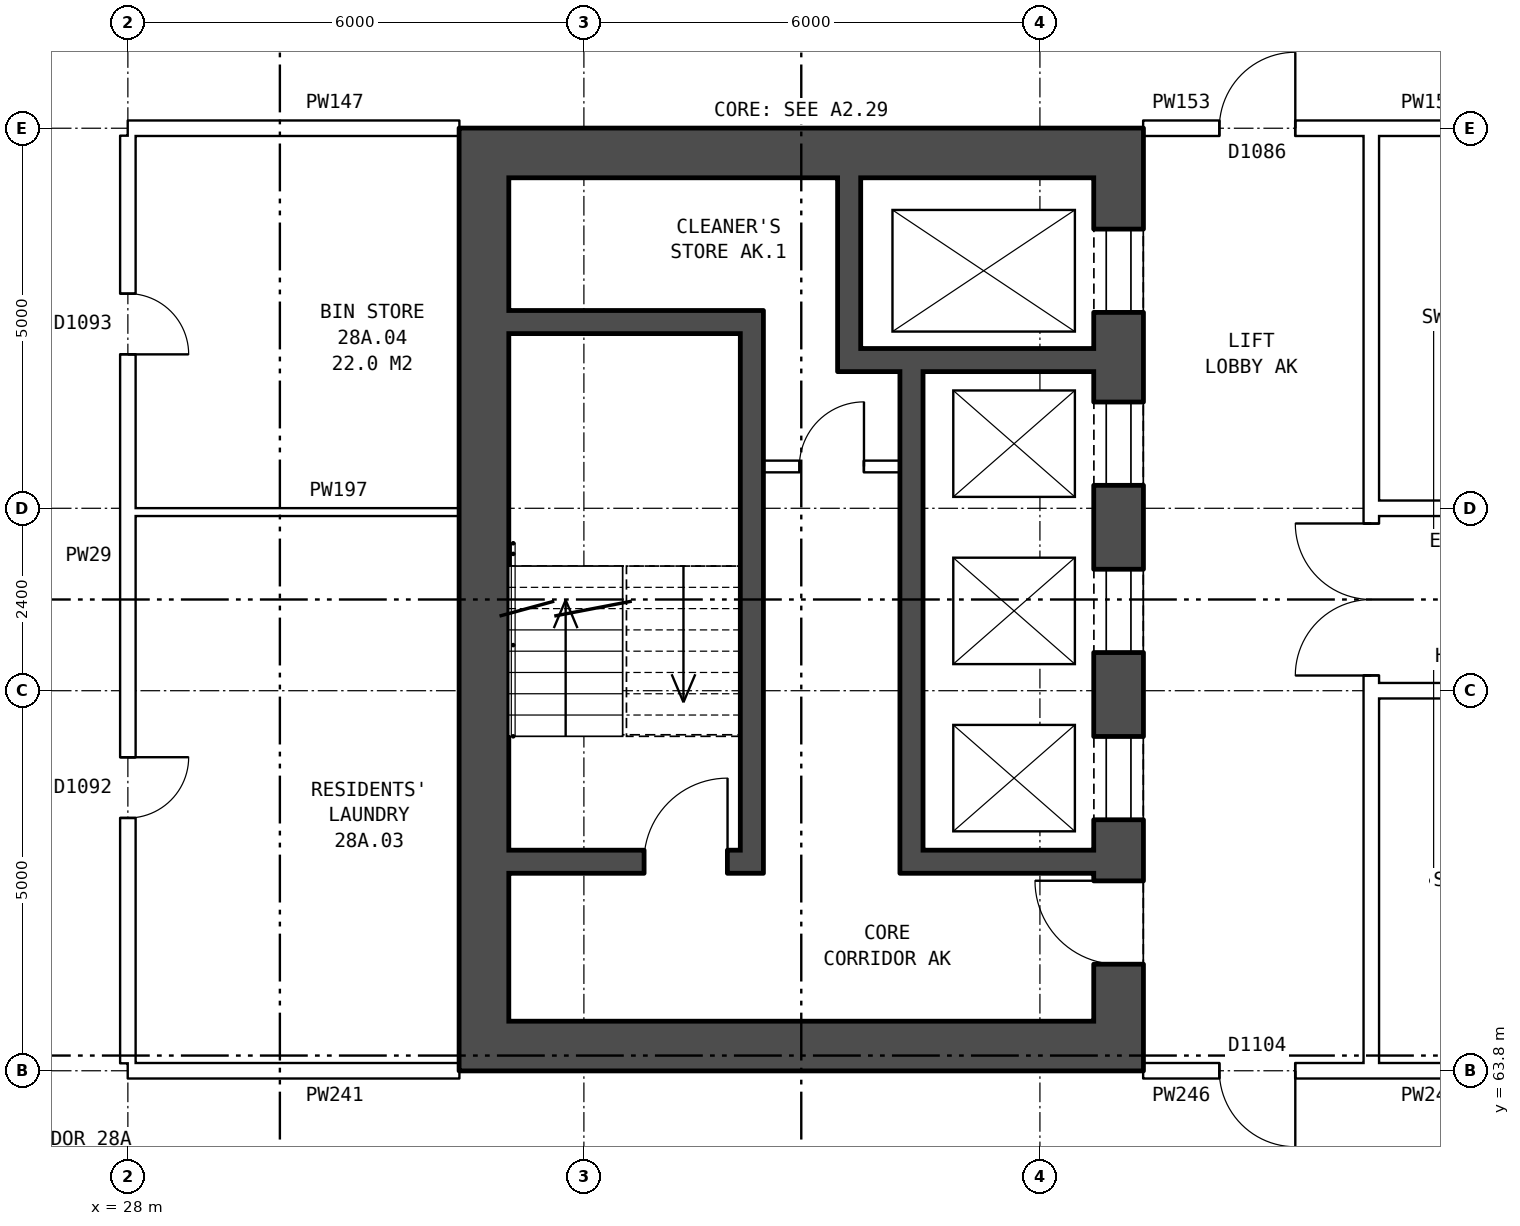
"""IFC4 building model, lengths in metres.
Left out: names, types, materials, properties, quantities, classifications, styles, units other than length and angle.
Written with IfcOpenShell. Run it as: python <this file> out.ifc"""

import sys

from ifc_helpers import new_model, si_unit, direction, frame, frame_2d, origin, place, context, subcontext, project, spatial, rectangle, extrude, element, fill, save


model = new_model("IFC4")
c1 = context("Model", 3, precision=1e-05, world=origin(), true_north=direction((0.0, 1.0)))
c2 = subcontext(c1, "Body", "Model", "MODEL_VIEW")
j1 = project(units=[si_unit("LENGTHUNIT", "METRE"), si_unit("PLANEANGLEUNIT", "RADIAN")], contexts=[c1])
p1 = place(None, origin())
s1 = spatial("IfcSite", under=j1, at=p1, CompositionType="ELEMENT")
p2 = place(p1, origin())
s2 = spatial("IfcBuilding", under=s1, at=p2, CompositionType="ELEMENT")
p3 = place(p2, frame((0.0, 0.0, 102.6)))
s3 = spatial("IfcBuildingStorey", under=s2, at=p3, CompositionType="ELEMENT", Elevation=102.6)
p4 = place(p3, frame((41.035, 75.55, 0.0), z_axis=(0.0, 0.0, 1.0), x_axis=(0.0, -1.0, 0.0)))
e1 = element("IfcWall", 1, at=p4, inside=s3, PredefinedType="SHEAR", context=c2, shape_type="SweptSolid", body=[
    extrude(rectangle(XDim=11.1, YDim=0.65, at=frame_2d((5.55, 0.0))), origin(), (0.0, 0.0, 1.0), 2.85),
])
p5 = place(p4, frame((0.675, 0.0, 0.0)))
e2 = element("IfcOpeningElement", 2, at=p5, cuts=e1, PredefinedType="OPENING", context=c2, shape_type="SweptSolid", body=[
    extrude(rectangle(XDim=1.1, YDim=2.1, at=frame_2d((0.55, 1.05))), frame((0.0, 0.335, 0.0), z_axis=(0.0, -1.0, 0.0), x_axis=(1.0, 0.0, 0.0)), (0.0, 0.0, 1.0), 0.67),
])
p6 = place(p4, frame((2.95, 0.0, 0.0)))
e3 = element("IfcOpeningElement", 3, at=p6, cuts=e1, PredefinedType="OPENING", context=c2, shape_type="SweptSolid", body=[
    extrude(rectangle(XDim=1.1, YDim=2.1, at=frame_2d((0.55, 1.05))), frame((0.0, 0.335, 0.0), z_axis=(0.0, -1.0, 0.0), x_axis=(1.0, 0.0, 0.0)), (0.0, 0.0, 1.0), 0.67),
])
p7 = place(p4, frame((5.15, 0.0, 0.0)))
e4 = element("IfcOpeningElement", 4, at=p7, cuts=e1, PredefinedType="OPENING", context=c2, shape_type="SweptSolid", body=[
    extrude(rectangle(XDim=1.1, YDim=2.1, at=frame_2d((0.55, 1.05))), frame((0.0, 0.335, 0.0), z_axis=(0.0, -1.0, 0.0), x_axis=(1.0, 0.0, 0.0)), (0.0, 0.0, 1.0), 0.67),
])
p8 = place(p4, frame((7.35, 0.0, 0.0)))
e5 = element("IfcOpeningElement", 5, at=p8, cuts=e1, PredefinedType="OPENING", context=c2, shape_type="SweptSolid", body=[
    extrude(rectangle(XDim=1.1, YDim=2.1, at=frame_2d((0.55, 1.05))), frame((0.0, 0.335, 0.0), z_axis=(0.0, -1.0, 0.0), x_axis=(1.0, 0.0, 0.0)), (0.0, 0.0, 1.0), 0.67),
])
p9 = place(p4, frame((9.25, 0.0, 0.0)))
e6 = element("IfcOpeningElement", 6, at=p9, cuts=e1, PredefinedType="OPENING", context=c2, shape_type="SweptSolid", body=[
    extrude(rectangle(XDim=1.1, YDim=2.1, at=frame_2d((0.55, 1.05))), frame((0.0, 0.335, 0.0), z_axis=(0.0, -1.0, 0.0), x_axis=(1.0, 0.0, 0.0)), (0.0, 0.0, 1.0), 0.67),
])
p10 = place(p3, frame((32.685, 75.55, 0.0), z_axis=(0.0, 0.0, 1.0), x_axis=(0.0, -1.0, 0.0)))
e7 = element("IfcWall", 7, at=p10, inside=s3, PredefinedType="SHEAR", context=c2, shape_type="SweptSolid", body=[
    extrude(rectangle(XDim=11.1, YDim=0.65, at=frame_2d((5.55, 0.0))), origin(), (0.0, 0.0, 1.0), 2.85),
])
for number, where, z_axis, x_axis in (
    (8, (41.36, 75.875, 0.0), (0.0, 0.0, 1.0), (-1.0, 0.0, 0.0)),
    (9, (41.36, 64.125, 0.0), (0.0, 0.0, 1.0), (-1.0, 0.0, 0.0)),
):
    element("IfcWall", number, at=place(p3, frame(where, z_axis=z_axis, x_axis=x_axis)), inside=s3, PredefinedType="SHEAR", context=c2, shape_type="SweptSolid", body=[
        extrude(rectangle(XDim=9.0, YDim=0.65, at=frame_2d((4.5, 0.0))), origin(), (0.0, 0.0, 1.0), 2.85),
    ])
p11 = place(p3, frame((36.06, 73.65, 0.0), z_axis=(0.0, 0.0, 1.0), x_axis=(-1.0, 0.0, 0.0)))
e10 = element("IfcWall", 10, at=p11, inside=s3, PredefinedType="SHEAR", context=c2, shape_type="SweptSolid", body=[
    extrude(rectangle(XDim=3.05, YDim=0.3, at=frame_2d((1.525, 0.0))), origin(), (0.0, 0.0, 1.0), 2.85),
])
p12 = place(p3, frame((40.71, 73.15, 0.0), z_axis=(0.0, 0.0, 1.0), x_axis=(-1.0, 0.0, 0.0)))
e11 = element("IfcWall", 11, at=p12, inside=s3, PredefinedType="SHEAR", context=c2, shape_type="SweptSolid", body=[
    extrude(rectangle(XDim=3.37, YDim=0.3, at=frame_2d((1.685, 0.0))), origin(), (0.0, 0.0, 1.0), 2.85),
])
p13 = place(p3, frame((38.16, 71.75, 0.0), z_axis=(0.0, 0.0, 1.0), x_axis=(-1.0, 0.0, 0.0)))
e12 = element("IfcWall", 12, at=p13, inside=s3, PredefinedType="PARTITIONING", context=c2, shape_type="SweptSolid", body=[
    extrude(rectangle(XDim=1.8, YDim=0.15, at=frame_2d((0.9, 0.0))), origin(), (0.0, 0.0, 1.0), 2.85),
])
p14 = place(p13, frame((0.475, 0.0, 0.0)))
e13 = element("IfcOpeningElement", 13, at=p14, cuts=e12, PredefinedType="OPENING", context=c2, shape_type="SweptSolid", body=[
    extrude(rectangle(XDim=0.85, YDim=2.1, at=frame_2d((0.425, 1.05))), frame((0.0, 0.085, 0.0), z_axis=(0.0, -1.0, 0.0), x_axis=(1.0, 0.0, 0.0)), (0.0, 0.0, 1.0), 0.17),
])
p15 = place(p3, frame((40.71, 66.55, 0.0), z_axis=(0.0, 0.0, 1.0), x_axis=(-1.0, 0.0, 0.0)))
e14 = element("IfcWall", 14, at=p15, inside=s3, PredefinedType="SHEAR", context=c2, shape_type="SweptSolid", body=[
    extrude(rectangle(XDim=2.25, YDim=0.3, at=frame_2d((1.125, 0.0))), origin(), (0.0, 0.0, 1.0), 2.85),
])
p16 = place(p3, frame((36.06, 66.55, 0.0), z_axis=(0.0, 0.0, 1.0), x_axis=(-1.0, 0.0, 0.0)))
e15 = element("IfcWall", 15, at=p16, inside=s3, PredefinedType="SHEAR", context=c2, shape_type="SweptSolid", body=[
    extrude(rectangle(XDim=3.05, YDim=0.3, at=frame_2d((1.525, 0.0))), origin(), (0.0, 0.0, 1.0), 2.85),
])
p17 = place(p16, frame((0.17, 0.0, 0.0)))
e16 = element("IfcOpeningElement", 16, at=p17, cuts=e15, PredefinedType="OPENING", context=c2, shape_type="SweptSolid", body=[
    extrude(rectangle(XDim=1.1, YDim=2.1, at=frame_2d((0.55, 1.05))), frame((0.0, 0.16, 0.0), z_axis=(0.0, -1.0, 0.0), x_axis=(1.0, 0.0, 0.0)), (0.0, 0.0, 1.0), 0.32),
])
p18 = place(p3, frame((38.31, 73.0, 0.0), z_axis=(0.0, 0.0, 1.0), x_axis=(0.0, -1.0, 0.0)))
e17 = element("IfcWall", 17, at=p18, inside=s3, PredefinedType="SHEAR", context=c2, shape_type="SweptSolid", body=[
    extrude(rectangle(XDim=6.6, YDim=0.3, at=frame_2d((3.3, 0.0))), origin(), (0.0, 0.0, 1.0), 2.85),
])
p19 = place(p3, frame((37.49, 75.55, 0.0), z_axis=(0.0, 0.0, 1.0), x_axis=(0.0, -1.0, 0.0)))
e18 = element("IfcWall", 18, at=p19, inside=s3, PredefinedType="SHEAR", context=c2, shape_type="SweptSolid", body=[
    extrude(rectangle(XDim=2.25, YDim=0.3, at=frame_2d((1.125, 0.0))), origin(), (0.0, 0.0, 1.0), 2.85),
])
p20 = place(p3, frame((36.21, 73.8, 0.0), z_axis=(0.0, 0.0, 1.0), x_axis=(0.0, -1.0, 0.0)))
e19 = element("IfcWall", 19, at=p20, inside=s3, PredefinedType="SHEAR", context=c2, shape_type="SweptSolid", body=[
    extrude(rectangle(XDim=7.4, YDim=0.3, at=frame_2d((3.7, 0.0))), origin(), (0.0, 0.0, 1.0), 2.85),
])
p21 = place(p3, frame((44.36, 63.9, 0.0), z_axis=(0.0, 0.0, 1.0), x_axis=(0.0, 1.0, 0.0)))
e20 = element("IfcWall", 20, at=p21, inside=s3, PredefinedType="PARTITIONING", context=c2, shape_type="SweptSolid", body=[
    extrude(rectangle(XDim=12.2, YDim=0.2, at=frame_2d((6.1, 0.0))), origin(), (0.0, 0.0, 1.0), 2.85),
])
p22 = place(p21, frame((5.1, 0.0, 0.0)))
e21 = element("IfcOpeningElement", 21, at=p22, cuts=e20, PredefinedType="OPENING", context=c2, shape_type="SweptSolid", body=[
    extrude(rectangle(XDim=2.0, YDim=2.1, at=frame_2d((1.0, 1.05))), frame((0.0, 0.11, 0.0), z_axis=(0.0, -1.0, 0.0), x_axis=(1.0, 0.0, 0.0)), (0.0, 0.0, 1.0), 0.22),
])
p23 = place(p3, frame((28.0, 63.8, 0.0), z_axis=(0.0, 0.0, 1.0), x_axis=(1.0, 0.0, 0.0)))
e22 = element("IfcWall", 22, at=p23, inside=s3, PredefinedType="PARTITIONING", context=c2, shape_type="SweptSolid", body=[
    extrude(rectangle(XDim=4.36, YDim=0.2, at=frame_2d((2.18, 0.0))), origin(), (0.0, 0.0, 1.0), 2.85),
])
p24 = place(p3, frame((41.36, 63.8, 0.0), z_axis=(0.0, 0.0, 1.0), x_axis=(1.0, 0.0, 0.0)))
e23 = element("IfcWall", 23, at=p24, inside=s3, PredefinedType="PARTITIONING", context=c2, shape_type="SweptSolid", body=[
    extrude(rectangle(XDim=3.0, YDim=0.2, at=frame_2d((1.5, 0.0))), origin(), (0.0, 0.0, 1.0), 2.85),
])
p25 = place(p24, frame((1.0, 0.0, 0.0)))
e24 = element("IfcOpeningElement", 24, at=p25, cuts=e23, PredefinedType="OPENING", context=c2, shape_type="SweptSolid", body=[
    extrude(rectangle(XDim=1.0, YDim=2.1, at=frame_2d((0.5, 1.05))), frame((0.0, 0.11, 0.0), z_axis=(0.0, -1.0, 0.0), x_axis=(1.0, 0.0, 0.0)), (0.0, 0.0, 1.0), 0.22),
])
p26 = place(p3, frame((44.36, 63.8, 0.0), z_axis=(0.0, 0.0, 1.0), x_axis=(1.0, 0.0, 0.0)))
e25 = element("IfcWall", 25, at=p26, inside=s3, PredefinedType="PARTITIONING", context=c2, shape_type="SweptSolid", body=[
    extrude(rectangle(XDim=1.54, YDim=0.2, at=frame_2d((0.77, 0.0))), origin(), (0.0, 0.0, 1.0), 2.85),
])
p27 = place(p3, frame((44.36, 68.8, 0.0), z_axis=(0.0, 0.0, 1.0), x_axis=(1.0, 0.0, 0.0)))
e26 = element("IfcWall", 26, at=p27, inside=s3, PredefinedType="PARTITIONING", context=c2, shape_type="SweptSolid", body=[
    extrude(rectangle(XDim=19.28, YDim=0.2, at=frame_2d((9.64, 0.0))), origin(), (0.0, 0.0, 1.0), 2.85),
])
p28 = place(p27, frame((14.64, 0.0, 0.0)))
e27 = element("IfcOpeningElement", 27, at=p28, cuts=e26, PredefinedType="OPENING", context=c2, shape_type="SweptSolid", body=[
    extrude(rectangle(XDim=1.0, YDim=2.1, at=frame_2d((0.5, 1.05))), frame((0.0, 0.11, 0.0), z_axis=(0.0, -1.0, 0.0), x_axis=(1.0, 0.0, 0.0)), (0.0, 0.0, 1.0), 0.22),
])
p29 = place(p27, frame((11.64, 0.0, 0.0)))
e28 = element("IfcOpeningElement", 28, at=p29, cuts=e26, PredefinedType="OPENING", context=c2, shape_type="SweptSolid", body=[
    extrude(rectangle(XDim=1.0, YDim=2.1, at=frame_2d((0.5, 1.05))), frame((0.0, 0.11, 0.0), z_axis=(0.0, -1.0, 0.0), x_axis=(1.0, 0.0, 0.0)), (0.0, 0.0, 1.0), 0.22),
])
p30 = place(p27, frame((5.64, 0.0, 0.0)))
e29 = element("IfcOpeningElement", 29, at=p30, cuts=e26, PredefinedType="OPENING", context=c2, shape_type="SweptSolid", body=[
    extrude(rectangle(XDim=1.0, YDim=2.1, at=frame_2d((0.5, 1.05))), frame((0.0, 0.11, 0.0), z_axis=(0.0, -1.0, 0.0), x_axis=(1.0, 0.0, 0.0)), (0.0, 0.0, 1.0), 0.22),
])
p31 = place(p3, frame((28.1, 71.15, 0.0), z_axis=(0.0, 0.0, 1.0), x_axis=(1.0, 0.0, 0.0)))
e30 = element("IfcWall", 30, at=p31, inside=s3, PredefinedType="PARTITIONING", context=c2, shape_type="SweptSolid", body=[
    extrude(rectangle(XDim=4.26, YDim=0.1, at=frame_2d((2.13, 0.0))), origin(), (0.0, 0.0, 1.0), 2.85),
])
p32 = place(p3, frame((44.36, 71.2, 0.0), z_axis=(0.0, 0.0, 1.0), x_axis=(1.0, 0.0, 0.0)))
e31 = element("IfcWall", 31, at=p32, inside=s3, PredefinedType="PARTITIONING", context=c2, shape_type="SweptSolid", body=[
    extrude(rectangle(XDim=19.28, YDim=0.2, at=frame_2d((9.64, 0.0))), origin(), (0.0, 0.0, 1.0), 2.85),
])
p33 = place(p32, frame((14.64, 0.0, 0.0)))
e32 = element("IfcOpeningElement", 32, at=p33, cuts=e31, PredefinedType="OPENING", context=c2, shape_type="SweptSolid", body=[
    extrude(rectangle(XDim=1.0, YDim=2.1, at=frame_2d((0.5, 1.05))), frame((0.0, 0.11, 0.0), z_axis=(0.0, -1.0, 0.0), x_axis=(1.0, 0.0, 0.0)), (0.0, 0.0, 1.0), 0.22),
])
p34 = place(p32, frame((5.64, 0.0, 0.0)))
e33 = element("IfcOpeningElement", 33, at=p34, cuts=e31, PredefinedType="OPENING", context=c2, shape_type="SweptSolid", body=[
    extrude(rectangle(XDim=1.0, YDim=2.1, at=frame_2d((0.5, 1.05))), frame((0.0, 0.11, 0.0), z_axis=(0.0, -1.0, 0.0), x_axis=(1.0, 0.0, 0.0)), (0.0, 0.0, 1.0), 0.22),
])
p35 = place(p3, frame((28.0, 76.2, 0.0), z_axis=(0.0, 0.0, 1.0), x_axis=(1.0, 0.0, 0.0)))
e34 = element("IfcWall", 34, at=p35, inside=s3, PredefinedType="PARTITIONING", context=c2, shape_type="SweptSolid", body=[
    extrude(rectangle(XDim=4.36, YDim=0.2, at=frame_2d((2.18, 0.0))), origin(), (0.0, 0.0, 1.0), 2.85),
])
p36 = place(p3, frame((41.36, 76.2, 0.0), z_axis=(0.0, 0.0, 1.0), x_axis=(1.0, 0.0, 0.0)))
e35 = element("IfcWall", 35, at=p36, inside=s3, PredefinedType="PARTITIONING", context=c2, shape_type="SweptSolid", body=[
    extrude(rectangle(XDim=3.0, YDim=0.2, at=frame_2d((1.5, 0.0))), origin(), (0.0, 0.0, 1.0), 2.85),
])
p37 = place(p36, frame((1.0, 0.0, 0.0)))
e36 = element("IfcOpeningElement", 36, at=p37, cuts=e35, PredefinedType="OPENING", context=c2, shape_type="SweptSolid", body=[
    extrude(rectangle(XDim=1.0, YDim=2.1, at=frame_2d((0.5, 1.05))), frame((0.0, 0.11, 0.0), z_axis=(0.0, -1.0, 0.0), x_axis=(1.0, 0.0, 0.0)), (0.0, 0.0, 1.0), 0.22),
])
p38 = place(p3, frame((44.36, 76.2, 0.0), z_axis=(0.0, 0.0, 1.0), x_axis=(1.0, 0.0, 0.0)))
e37 = element("IfcWall", 37, at=p38, inside=s3, PredefinedType="PARTITIONING", context=c2, shape_type="SweptSolid", body=[
    extrude(rectangle(XDim=1.54, YDim=0.2, at=frame_2d((0.77, 0.0))), origin(), (0.0, 0.0, 1.0), 2.85),
])
p39 = place(p3, frame((28.0, 63.9, 0.0), z_axis=(0.0, 0.0, 1.0), x_axis=(0.0, 1.0, 0.0)))
e38 = element("IfcWall", 38, at=p39, inside=s3, PredefinedType="PARTITIONING", context=c2, shape_type="SweptSolid", body=[
    extrude(rectangle(XDim=12.2, YDim=0.2, at=frame_2d((6.1, 0.0))), origin(), (0.0, 0.0, 1.0), 2.85),
])
p40 = place(p39, frame((3.225, 0.0, 0.0)))
e39 = element("IfcOpeningElement", 39, at=p40, cuts=e38, PredefinedType="OPENING", context=c2, shape_type="SweptSolid", body=[
    extrude(rectangle(XDim=0.8, YDim=2.1, at=frame_2d((0.4, 1.05))), frame((0.0, 0.11, 0.0), z_axis=(0.0, -1.0, 0.0), x_axis=(1.0, 0.0, 0.0)), (0.0, 0.0, 1.0), 0.22),
])
p41 = place(p39, frame((9.325, 0.0, 0.0)))
e40 = element("IfcOpeningElement", 40, at=p41, cuts=e38, PredefinedType="OPENING", context=c2, shape_type="SweptSolid", body=[
    extrude(rectangle(XDim=0.8, YDim=2.1, at=frame_2d((0.4, 1.05))), frame((0.0, 0.11, 0.0), z_axis=(0.0, -1.0, 0.0), x_axis=(1.0, 0.0, 0.0)), (0.0, 0.0, 1.0), 0.22),
])
p42 = place(p5, origin())
e41 = element("IfcDoor", 41, at=p42, inside=s3, OperationType="DOUBLE_DOOR_SLIDING", PredefinedType="DOOR", context=c2, shape_type="SweptSolid", body=[
    extrude(rectangle(XDim=1.1, YDim=2.1, at=frame_2d((0.55, 1.05))), frame((0.0, -0.26, 0.0), z_axis=(0.0, -1.0, 0.0), x_axis=(1.0, 0.0, 0.0)), (0.0, 0.0, 1.0), 0.05),
])
fill(e2, e41)
p43 = place(p6, origin())
e42 = element("IfcDoor", 42, at=p43, inside=s3, OperationType="DOUBLE_DOOR_SLIDING", PredefinedType="DOOR", context=c2, shape_type="SweptSolid", body=[
    extrude(rectangle(XDim=1.1, YDim=2.1, at=frame_2d((0.55, 1.05))), frame((0.0, -0.26, 0.0), z_axis=(0.0, -1.0, 0.0), x_axis=(1.0, 0.0, 0.0)), (0.0, 0.0, 1.0), 0.05),
])
fill(e3, e42)
p44 = place(p7, origin())
e43 = element("IfcDoor", 43, at=p44, inside=s3, OperationType="DOUBLE_DOOR_SLIDING", PredefinedType="DOOR", context=c2, shape_type="SweptSolid", body=[
    extrude(rectangle(XDim=1.1, YDim=2.1, at=frame_2d((0.55, 1.05))), frame((0.0, -0.26, 0.0), z_axis=(0.0, -1.0, 0.0), x_axis=(1.0, 0.0, 0.0)), (0.0, 0.0, 1.0), 0.05),
])
fill(e4, e43)
p45 = place(p8, origin())
e44 = element("IfcDoor", 44, at=p45, inside=s3, OperationType="DOUBLE_DOOR_SLIDING", PredefinedType="DOOR", context=c2, shape_type="SweptSolid", body=[
    extrude(rectangle(XDim=1.1, YDim=2.1, at=frame_2d((0.55, 1.05))), frame((0.0, -0.26, 0.0), z_axis=(0.0, -1.0, 0.0), x_axis=(1.0, 0.0, 0.0)), (0.0, 0.0, 1.0), 0.05),
])
fill(e5, e44)
p46 = place(p9, frame((1.1, 0.0, 0.0), z_axis=(0.0, 0.0, 1.0), x_axis=(-1.0, 0.0, 0.0)))
e45 = element("IfcDoor", 45, at=p46, inside=s3, OperationType="SINGLE_SWING_RIGHT", PredefinedType="DOOR", context=c2, shape_type="SweptSolid", body=[
    extrude(rectangle(XDim=1.1, YDim=2.1, at=frame_2d((0.55, 1.05))), frame((0.0, 0.31, 0.0), z_axis=(0.0, -1.0, 0.0), x_axis=(1.0, 0.0, 0.0)), (0.0, 0.0, 1.0), 0.05),
])
fill(e6, e45)
p47 = place(p17, frame((1.1, 0.0, 0.0), z_axis=(0.0, 0.0, 1.0), x_axis=(-1.0, 0.0, 0.0)))
e46 = element("IfcDoor", 46, at=p47, inside=s3, OperationType="SINGLE_SWING_RIGHT", PredefinedType="DOOR", context=c2, shape_type="SweptSolid", body=[
    extrude(rectangle(XDim=1.1, YDim=2.1, at=frame_2d((0.55, 1.05))), frame((0.0, 0.025, 0.0), z_axis=(0.0, -1.0, 0.0), x_axis=(1.0, 0.0, 0.0)), (0.0, 0.0, 1.0), 0.05),
])
fill(e16, e46)
p48 = place(p14, frame((0.85, 0.0, 0.0), z_axis=(0.0, 0.0, 1.0), x_axis=(-1.0, 0.0, 0.0)))
e47 = element("IfcDoor", 47, at=p48, inside=s3, OperationType="SINGLE_SWING_RIGHT", PredefinedType="DOOR", context=c2, shape_type="SweptSolid", body=[
    extrude(rectangle(XDim=0.85, YDim=2.1, at=frame_2d((0.425, 1.05))), frame((0.0, 0.025, 0.0), z_axis=(0.0, -1.0, 0.0), x_axis=(1.0, 0.0, 0.0)), (0.0, 0.0, 1.0), 0.05),
])
fill(e13, e47)
p49 = place(p22, origin())
e48 = element("IfcDoor", 48, at=p49, inside=s3, OperationType="DOUBLE_DOOR_SINGLE_SWING", PredefinedType="DOOR", context=c2, shape_type="SweptSolid", body=[
    extrude(rectangle(XDim=2.0, YDim=2.1, at=frame_2d((1.0, 1.05))), frame((0.0, 0.025, 0.0), z_axis=(0.0, -1.0, 0.0), x_axis=(1.0, 0.0, 0.0)), (0.0, 0.0, 1.0), 0.05),
])
fill(e21, e48)
p50 = place(p25, frame((1.0, 0.0, 0.0), z_axis=(0.0, 0.0, 1.0), x_axis=(-1.0, 0.0, 0.0)))
e49 = element("IfcDoor", 49, at=p50, inside=s3, OperationType="SINGLE_SWING_LEFT", PredefinedType="DOOR", context=c2, shape_type="SweptSolid", body=[
    extrude(rectangle(XDim=1.0, YDim=2.1, at=frame_2d((0.5, 1.05))), frame((0.0, 0.025, 0.0), z_axis=(0.0, -1.0, 0.0), x_axis=(1.0, 0.0, 0.0)), (0.0, 0.0, 1.0), 0.05),
])
fill(e24, e49)
p51 = place(p37, origin())
e50 = element("IfcDoor", 50, at=p51, inside=s3, OperationType="SINGLE_SWING_RIGHT", PredefinedType="DOOR", context=c2, shape_type="SweptSolid", body=[
    extrude(rectangle(XDim=1.0, YDim=2.1, at=frame_2d((0.5, 1.05))), frame((0.0, 0.025, 0.0), z_axis=(0.0, -1.0, 0.0), x_axis=(1.0, 0.0, 0.0)), (0.0, 0.0, 1.0), 0.05),
])
fill(e36, e50)
p52 = place(p40, frame((0.8, 0.0, 0.0), z_axis=(0.0, 0.0, 1.0), x_axis=(-1.0, 0.0, 0.0)))
e51 = element("IfcDoor", 51, at=p52, inside=s3, OperationType="SINGLE_SWING_LEFT", PredefinedType="DOOR", context=c2, shape_type="SweptSolid", body=[
    extrude(rectangle(XDim=0.8, YDim=2.1, at=frame_2d((0.4, 1.05))), frame((0.0, 0.025, 0.0), z_axis=(0.0, -1.0, 0.0), x_axis=(1.0, 0.0, 0.0)), (0.0, 0.0, 1.0), 0.05),
])
fill(e39, e51)
p53 = place(p41, frame((0.8, 0.0, 0.0), z_axis=(0.0, 0.0, 1.0), x_axis=(-1.0, 0.0, 0.0)))
e52 = element("IfcDoor", 52, at=p53, inside=s3, OperationType="SINGLE_SWING_RIGHT", PredefinedType="DOOR", context=c2, shape_type="SweptSolid", body=[
    extrude(rectangle(XDim=0.8, YDim=2.1, at=frame_2d((0.4, 1.05))), frame((0.0, 0.025, 0.0), z_axis=(0.0, -1.0, 0.0), x_axis=(1.0, 0.0, 0.0)), (0.0, 0.0, 1.0), 0.05),
])
fill(e40, e52)
save(model, sys.argv[1])
